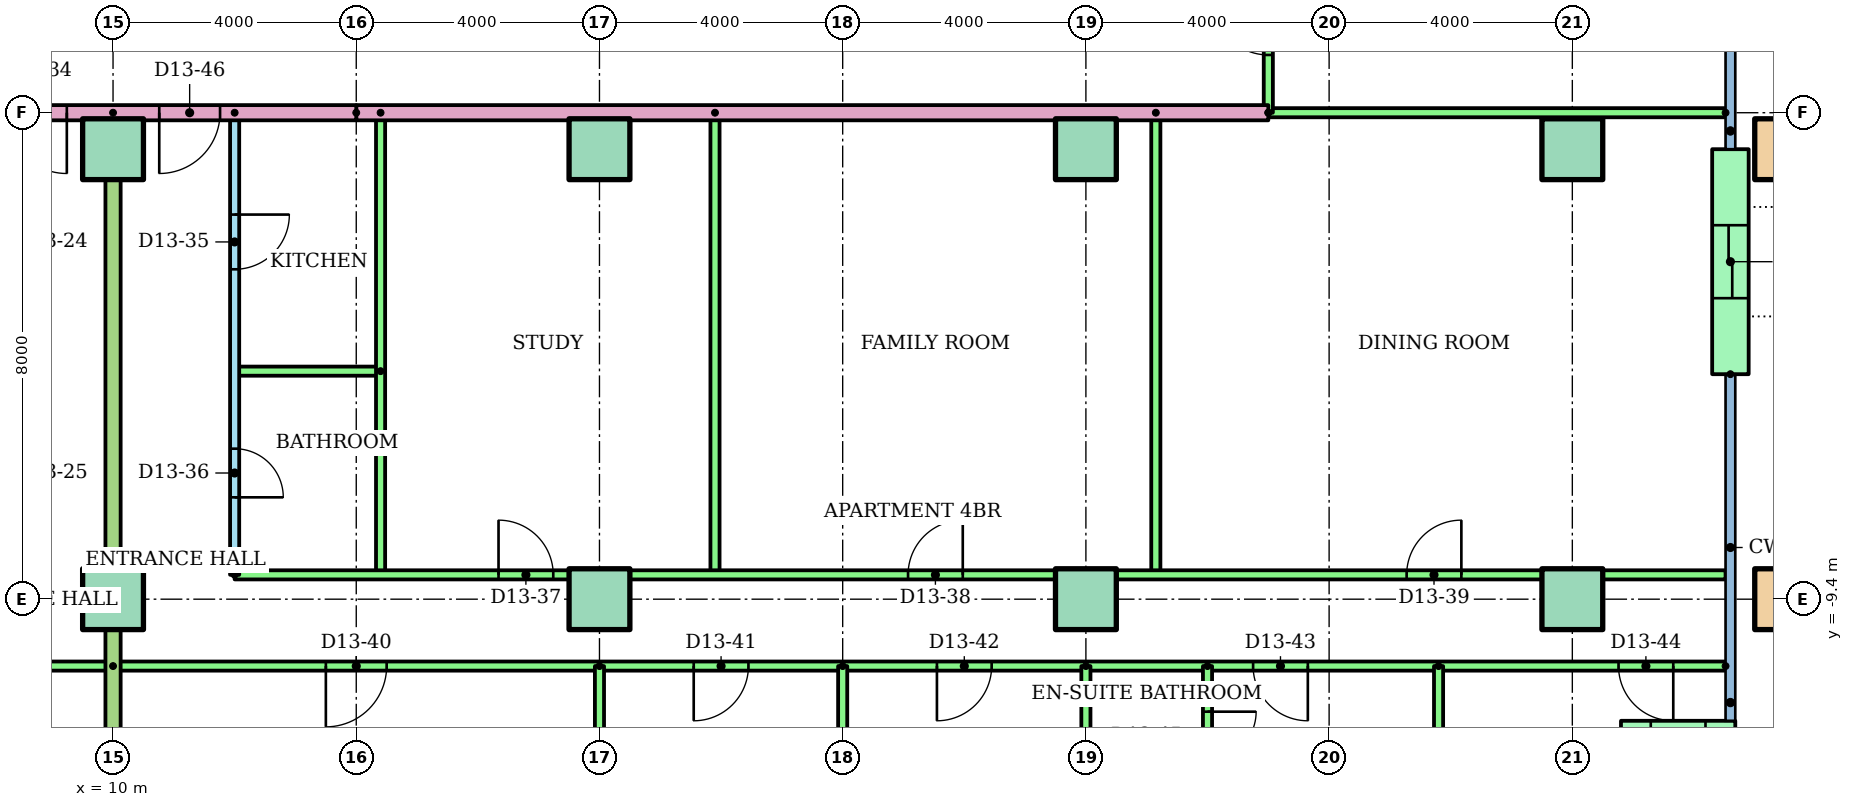
"""IFC4 building model, lengths in metres.
Left out: names, types, materials, properties, quantities, classifications, styles, units other than length and angle.
Written with IfcOpenShell. Run it as: python <this file> out.ifc"""

import sys

from ifc_helpers import new_model, si_unit, direction, frame, frame_2d, origin, origin_2d, place, context, subcontext, project, spatial, rectangle, hollow_rectangle, extrude, element, fill, save


model = new_model("IFC4")
c1 = context("Model", 3, precision=1e-05, world=origin(), true_north=direction((0.0, 1.0)))
c2 = subcontext(c1, "Body", "Model", "MODEL_VIEW")
j1 = project(units=[si_unit("LENGTHUNIT", "METRE"), si_unit("PLANEANGLEUNIT", "RADIAN")], contexts=[c1])
p1 = place(None, origin())
s1 = spatial("IfcSite", under=j1, at=p1, CompositionType="ELEMENT")
p2 = place(p1, origin())
s2 = spatial("IfcBuilding", under=s1, at=p2, CompositionType="ELEMENT")
p3 = place(p2, frame((0.0, 0.0, 51.2)))
s3 = spatial("IfcBuildingStorey", under=s2, at=p3, CompositionType="ELEMENT", Elevation=51.2)
for number, where in (
    (1, (10.0, -9.4, 0.0)),
    (2, (18.0, -9.4, 0.0)),
    (3, (26.0, -9.4, 0.0)),
    (4, (34.0, -9.4, 0.0)),
):
    element("IfcColumn", number, at=place(p3, frame(where)), inside=s3, PredefinedType="COLUMN", context=c2, shape_type="SweptSolid", body=[
        extrude(rectangle(XDim=1.0, YDim=1.0, at=origin_2d()), origin(), (0.0, 0.0, 1.0), 3.2),
    ])
p4 = place(p3, frame((37.5, -9.4, 0.0)))
e5 = element("IfcColumn", 5, at=p4, inside=s3, PredefinedType="COLUMN", context=c2, shape_type="SweptSolid", body=[
    extrude(hollow_rectangle(XDim=1.0, YDim=1.0, WallThickness=0.05, at=origin_2d()), origin(), (0.0, 0.0, 1.0), 3.2),
])
for number, where in (
    (6, (10.0, -2.0, 0.0)),
    (7, (18.0, -2.0, 0.0)),
    (8, (26.0, -2.0, 0.0)),
    (9, (34.0, -2.0, 0.0)),
):
    element("IfcColumn", number, at=place(p3, frame(where)), inside=s3, PredefinedType="COLUMN", context=c2, shape_type="SweptSolid", body=[
        extrude(rectangle(XDim=1.0, YDim=1.0, at=origin_2d()), origin(), (0.0, 0.0, 1.0), 3.2),
    ])
p5 = place(p3, frame((37.5, -2.0, 0.0)))
e10 = element("IfcColumn", 10, at=p5, inside=s3, PredefinedType="COLUMN", context=c2, shape_type="SweptSolid", body=[
    extrude(hollow_rectangle(XDim=1.0, YDim=1.0, WallThickness=0.05, at=origin_2d()), origin(), (0.0, 0.0, 1.0), 3.2),
])
p6 = place(p3, frame((34.8, -11.7, 0.0)))
e11 = element("IfcWall", 11, at=p6, inside=s3, PredefinedType="STANDARD", context=c2, shape_type="SweptSolid", body=[
    extrude(rectangle(XDim=1.88, YDim=0.6, at=frame_2d((0.94, 0.0))), origin(), (0.0, 0.0, 1.0), 2.92),
])
p7 = place(p6, frame((0.49, 0.0, 0.9)))
e12 = element("IfcOpeningElement", 12, at=p7, cuts=e11, PredefinedType="OPENING", context=c2, shape_type="SweptSolid", body=[
    extrude(rectangle(XDim=0.9, YDim=1.5, at=frame_2d((0.45, 0.75))), frame((0.0, 0.31, 0.0), z_axis=(0.0, -1.0, 0.0), x_axis=(1.0, 0.0, 0.0)), (0.0, 0.0, 1.0), 0.62),
])
p8 = place(p3, frame((36.6, -5.7, 0.0), z_axis=(0.0, 0.0, 1.0), x_axis=(0.0, 1.0, 0.0)))
e13 = element("IfcWall", 13, at=p8, inside=s3, PredefinedType="STANDARD", context=c2, shape_type="SweptSolid", body=[
    extrude(rectangle(XDim=3.7, YDim=0.6, at=frame_2d((1.85, 0.0))), origin(), (0.0, 0.0, 1.0), 2.92),
])
p9 = place(p8, frame((1.25, 0.0, 0.0)))
e14 = element("IfcOpeningElement", 14, at=p9, cuts=e13, PredefinedType="OPENING", context=c2, shape_type="SweptSolid", body=[
    extrude(rectangle(XDim=1.2, YDim=2.1, at=frame_2d((0.6, 1.05))), frame((0.0, 0.31, 0.0), z_axis=(0.0, -1.0, 0.0), x_axis=(1.0, 0.0, 0.0)), (0.0, 0.0, 1.0), 0.62),
])
p10 = place(p3, frame((10.0, -10.5, 0.0), z_axis=(0.0, 0.0, 1.0), x_axis=(-1.0, 0.0, 0.0)))
e15 = element("IfcWall", 15, at=p10, inside=s3, PredefinedType="PARTITIONING", context=c2, shape_type="SweptSolid", body=[
    extrude(rectangle(XDim=24.0, YDim=0.15, at=frame_2d((12.0, 0.0))), origin(), (0.0, 0.0, 1.0), 2.4),
])
p11 = place(p10, frame((19.5, 0.0, 0.0)))
e16 = element("IfcOpeningElement", 16, at=p11, cuts=e15, PredefinedType="OPENING", context=c2, shape_type="SweptSolid", body=[
    extrude(rectangle(XDim=1.0, YDim=2.1, at=frame_2d((0.5, 1.05))), frame((0.0, 0.085, 0.0), z_axis=(0.0, -1.0, 0.0), x_axis=(1.0, 0.0, 0.0)), (0.0, 0.0, 1.0), 0.17),
])
p12 = place(p10, frame((13.55, 0.0, 0.0)))
e17 = element("IfcOpeningElement", 17, at=p12, cuts=e15, PredefinedType="OPENING", context=c2, shape_type="SweptSolid", body=[
    extrude(rectangle(XDim=0.9, YDim=2.1, at=frame_2d((0.45, 1.05))), frame((0.0, 0.085, 0.0), z_axis=(0.0, -1.0, 0.0), x_axis=(1.0, 0.0, 0.0)), (0.0, 0.0, 1.0), 0.17),
])
p13 = place(p10, frame((9.55, 0.0, 0.0)))
e18 = element("IfcOpeningElement", 18, at=p13, cuts=e15, PredefinedType="OPENING", context=c2, shape_type="SweptSolid", body=[
    extrude(rectangle(XDim=0.9, YDim=2.1, at=frame_2d((0.45, 1.05))), frame((0.0, 0.085, 0.0), z_axis=(0.0, -1.0, 0.0), x_axis=(1.0, 0.0, 0.0)), (0.0, 0.0, 1.0), 0.17),
])
p14 = place(p10, frame((5.55, 0.0, 0.0)))
e19 = element("IfcOpeningElement", 19, at=p14, cuts=e15, PredefinedType="OPENING", context=c2, shape_type="SweptSolid", body=[
    extrude(rectangle(XDim=0.9, YDim=2.1, at=frame_2d((0.45, 1.05))), frame((0.0, 0.085, 0.0), z_axis=(0.0, -1.0, 0.0), x_axis=(1.0, 0.0, 0.0)), (0.0, 0.0, 1.0), 0.17),
])
p15 = place(p10, frame((1.55, 0.0, 0.0)))
e20 = element("IfcOpeningElement", 20, at=p15, cuts=e15, PredefinedType="OPENING", context=c2, shape_type="SweptSolid", body=[
    extrude(rectangle(XDim=0.9, YDim=2.1, at=frame_2d((0.45, 1.05))), frame((0.0, 0.085, 0.0), z_axis=(0.0, -1.0, 0.0), x_axis=(1.0, 0.0, 0.0)), (0.0, 0.0, 1.0), 0.17),
])
p16 = place(p3, frame((12.0, -1.4, 0.0), z_axis=(0.0, 0.0, 1.0), x_axis=(0.0, -1.0, 0.0)))
e21 = element("IfcWall", 21, at=p16, inside=s3, PredefinedType="PARTITIONING", context=c2, shape_type="SweptSolid", body=[
    extrude(rectangle(XDim=7.6, YDim=0.15, at=frame_2d((3.8, 0.0))), origin(), (0.0, 0.0, 1.0), 2.4),
])
p17 = place(p16, frame((1.675, 0.0, 0.0)))
e22 = element("IfcOpeningElement", 22, at=p17, cuts=e21, PredefinedType="OPENING", context=c2, shape_type="SweptSolid", body=[
    extrude(rectangle(XDim=0.9, YDim=2.1, at=frame_2d((0.45, 1.05))), frame((0.0, 0.085, 0.0), z_axis=(0.0, -1.0, 0.0), x_axis=(1.0, 0.0, 0.0)), (0.0, 0.0, 1.0), 0.17),
])
p18 = place(p16, frame((5.525, 0.0, 0.0)))
e23 = element("IfcOpeningElement", 23, at=p18, cuts=e21, PredefinedType="OPENING", context=c2, shape_type="SweptSolid", body=[
    extrude(rectangle(XDim=0.8, YDim=2.1, at=frame_2d((0.4, 1.05))), frame((0.0, 0.085, 0.0), z_axis=(0.0, -1.0, 0.0), x_axis=(1.0, 0.0, 0.0)), (0.0, 0.0, 1.0), 0.17),
])
p19 = place(p3, frame((14.4, -5.65, 0.0), z_axis=(0.0, 0.0, 1.0), x_axis=(-1.0, 0.0, 0.0)))
e24 = element("IfcWall", 24, at=p19, inside=s3, PredefinedType="PARTITIONING", context=c2, shape_type="SweptSolid", body=[
    extrude(rectangle(XDim=2.4, YDim=0.15, at=frame_2d((1.2, 0.0))), origin(), (0.0, 0.0, 1.0), 2.4),
])
for number, where, z_axis, x_axis in (
    (25, (14.4, -1.4, 0.0), (0.0, 0.0, 1.0), (0.0, -1.0, 0.0)),
    (26, (19.9, -1.4, 0.0), (0.0, 0.0, 1.0), (0.0, -1.0, 0.0)),
    (27, (27.15, -1.4, 0.0), (0.0, 0.0, 1.0), (0.0, -1.0, 0.0)),
):
    element("IfcWall", number, at=place(p3, frame(where, z_axis=z_axis, x_axis=x_axis)), inside=s3, PredefinedType="PARTITIONING", context=c2, shape_type="SweptSolid", body=[
        extrude(rectangle(XDim=7.6, YDim=0.15, at=frame_2d((3.8, 0.0))), origin(), (0.0, 0.0, 1.0), 2.4),
    ])
p20 = place(p3, frame((12.0, -9.0, 0.0)))
e28 = element("IfcWall", 28, at=p20, inside=s3, PredefinedType="PARTITIONING", context=c2, shape_type="SweptSolid", body=[
    extrude(rectangle(XDim=24.52, YDim=0.15, at=frame_2d((12.26, 0.0))), origin(), (0.0, 0.0, 1.0), 2.4),
])
p21 = place(p20, frame((4.34, 0.0, 0.0)))
e29 = element("IfcOpeningElement", 29, at=p21, cuts=e28, PredefinedType="OPENING", context=c2, shape_type="SweptSolid", body=[
    extrude(rectangle(XDim=0.9, YDim=2.1, at=frame_2d((0.45, 1.05))), frame((0.0, 0.085, 0.0), z_axis=(0.0, -1.0, 0.0), x_axis=(1.0, 0.0, 0.0)), (0.0, 0.0, 1.0), 0.17),
])
p22 = place(p20, frame((11.075, 0.0, 0.0)))
e30 = element("IfcOpeningElement", 30, at=p22, cuts=e28, PredefinedType="OPENING", context=c2, shape_type="SweptSolid", body=[
    extrude(rectangle(XDim=0.9, YDim=2.1, at=frame_2d((0.45, 1.05))), frame((0.0, 0.085, 0.0), z_axis=(0.0, -1.0, 0.0), x_axis=(1.0, 0.0, 0.0)), (0.0, 0.0, 1.0), 0.17),
])
p23 = place(p20, frame((19.275, 0.0, 0.0)))
e31 = element("IfcOpeningElement", 31, at=p23, cuts=e28, PredefinedType="OPENING", context=c2, shape_type="SweptSolid", body=[
    extrude(rectangle(XDim=0.9, YDim=2.1, at=frame_2d((0.45, 1.05))), frame((0.0, 0.085, 0.0), z_axis=(0.0, -1.0, 0.0), x_axis=(1.0, 0.0, 0.0)), (0.0, 0.0, 1.0), 0.17),
])
p24 = place(p3, frame((36.52, -10.5, 0.0), z_axis=(0.0, 0.0, 1.0), x_axis=(-1.0, 0.0, 0.0)))
e32 = element("IfcWall", 32, at=p24, inside=s3, PredefinedType="PARTITIONING", context=c2, shape_type="SweptSolid", body=[
    extrude(rectangle(XDim=26.52, YDim=0.15, at=frame_2d((13.26, 0.0))), origin(), (0.0, 0.0, 1.0), 2.4),
])
p25 = place(p24, frame((22.02, 0.0, 0.0)))
e33 = element("IfcOpeningElement", 33, at=p25, cuts=e32, PredefinedType="OPENING", context=c2, shape_type="SweptSolid", body=[
    extrude(rectangle(XDim=1.0, YDim=2.1, at=frame_2d((0.5, 1.05))), frame((0.0, 0.085, 0.0), z_axis=(0.0, -1.0, 0.0), x_axis=(1.0, 0.0, 0.0)), (0.0, 0.0, 1.0), 0.17),
])
p26 = place(p24, frame((16.07, 0.0, 0.0)))
e34 = element("IfcOpeningElement", 34, at=p26, cuts=e32, PredefinedType="OPENING", context=c2, shape_type="SweptSolid", body=[
    extrude(rectangle(XDim=0.9, YDim=2.1, at=frame_2d((0.45, 1.05))), frame((0.0, 0.085, 0.0), z_axis=(0.0, -1.0, 0.0), x_axis=(1.0, 0.0, 0.0)), (0.0, 0.0, 1.0), 0.17),
])
p27 = place(p24, frame((12.07, 0.0, 0.0)))
e35 = element("IfcOpeningElement", 35, at=p27, cuts=e32, PredefinedType="OPENING", context=c2, shape_type="SweptSolid", body=[
    extrude(rectangle(XDim=0.9, YDim=2.1, at=frame_2d((0.45, 1.05))), frame((0.0, 0.085, 0.0), z_axis=(0.0, -1.0, 0.0), x_axis=(1.0, 0.0, 0.0)), (0.0, 0.0, 1.0), 0.17),
])
p28 = place(p24, frame((6.87, 0.0, 0.0)))
e36 = element("IfcOpeningElement", 36, at=p28, cuts=e32, PredefinedType="OPENING", context=c2, shape_type="SweptSolid", body=[
    extrude(rectangle(XDim=0.9, YDim=2.1, at=frame_2d((0.45, 1.05))), frame((0.0, 0.085, 0.0), z_axis=(0.0, -1.0, 0.0), x_axis=(1.0, 0.0, 0.0)), (0.0, 0.0, 1.0), 0.17),
])
p29 = place(p24, frame((0.86, 0.0, 0.0)))
e37 = element("IfcOpeningElement", 37, at=p29, cuts=e32, PredefinedType="OPENING", context=c2, shape_type="SweptSolid", body=[
    extrude(rectangle(XDim=0.9, YDim=2.1, at=frame_2d((0.45, 1.05))), frame((0.0, 0.085, 0.0), z_axis=(0.0, -1.0, 0.0), x_axis=(1.0, 0.0, 0.0)), (0.0, 0.0, 1.0), 0.17),
])
p30 = place(p3, frame((18.0, -10.5, 0.0), z_axis=(0.0, 0.0, 1.0), x_axis=(0.0, -1.0, 0.0)))
e38 = element("IfcWall", 38, at=p30, inside=s3, PredefinedType="PARTITIONING", context=c2, shape_type="SweptSolid", body=[
    extrude(rectangle(XDim=5.61, YDim=0.15, at=frame_2d((2.805, 0.0))), origin(), (0.0, 0.0, 1.0), 2.4),
])
p31 = place(p3, frame((22.0, -10.5, 0.0), z_axis=(0.0, 0.0, 1.0), x_axis=(0.0, -1.0, 0.0)))
e39 = element("IfcWall", 39, at=p31, inside=s3, PredefinedType="PARTITIONING", context=c2, shape_type="SweptSolid", body=[
    extrude(rectangle(XDim=5.621, YDim=0.15, at=frame_2d((2.811, 0.0))), origin(), (0.0, 0.0, 1.0), 2.4),
])
p32 = place(p3, frame((26.0, -10.5, 0.0), z_axis=(0.0, 0.0, 1.0), x_axis=(0.0, -1.0, 0.0)))
e40 = element("IfcWall", 40, at=p32, inside=s3, PredefinedType="PARTITIONING", context=c2, shape_type="SweptSolid", body=[
    extrude(rectangle(XDim=5.61, YDim=0.15, at=frame_2d((2.805, 0.0))), origin(), (0.0, 0.0, 1.0), 2.4),
])
p33 = place(p3, frame((31.8, -10.5, 0.0), z_axis=(0.0, 0.0, 1.0), x_axis=(0.0, -1.0, 0.0)))
e41 = element("IfcWall", 41, at=p33, inside=s3, PredefinedType="PARTITIONING", context=c2, shape_type="SweptSolid", body=[
    extrude(rectangle(XDim=3.82, YDim=0.15, at=frame_2d((1.91, 0.0))), origin(), (0.0, 0.0, 1.0), 2.4),
])
p34 = place(p3, frame((28.0, -10.5, 0.0), z_axis=(0.0, 0.0, 1.0), x_axis=(0.0, -1.0, 0.0)))
e42 = element("IfcWall", 42, at=p34, inside=s3, PredefinedType="PARTITIONING", context=c2, shape_type="SweptSolid", body=[
    extrude(rectangle(XDim=2.3, YDim=0.15, at=frame_2d((1.15, 0.0))), origin(), (0.0, 0.0, 1.0), 2.4),
])
p35 = place(p34, frame((0.75, 0.0, 0.0)))
e43 = element("IfcOpeningElement", 43, at=p35, cuts=e42, PredefinedType="OPENING", context=c2, shape_type="SweptSolid", body=[
    extrude(rectangle(XDim=0.8, YDim=2.1, at=frame_2d((0.4, 1.05))), frame((0.0, 0.085, 0.0), z_axis=(0.0, -1.0, 0.0), x_axis=(1.0, 0.0, 0.0)), (0.0, 0.0, 1.0), 0.17),
])
p36 = place(p3, frame((10.0, -1.4, 0.0), z_axis=(0.0, 0.0, 1.0), x_axis=(0.0, -1.0, 0.0)))
e44 = element("IfcWall", 44, at=p36, inside=s3, PredefinedType="PARTITIONING", context=c2, shape_type="SweptSolid", body=[
    extrude(rectangle(XDim=14.71, YDim=0.25, at=frame_2d((7.355, 0.0))), origin(), (0.0, 0.0, 1.0), 2.4),
])
p37 = place(p3, frame((29.0, -1.4, 0.0), z_axis=(0.0, 0.0, 1.0), x_axis=(-1.0, 0.0, 0.0)))
e45 = element("IfcWall", 45, at=p37, inside=s3, PredefinedType="PARTITIONING", context=c2, shape_type="SweptSolid", body=[
    extrude(rectangle(XDim=15.0, YDim=0.25, at=frame_2d((7.5, 0.0))), origin(), (0.0, 0.0, 1.0), 2.4),
])
p38 = place(p3, frame((36.52, -1.4, 0.0), z_axis=(0.0, 0.0, 1.0), x_axis=(-1.0, 0.0, 0.0)))
e46 = element("IfcWall", 46, at=p38, inside=s3, PredefinedType="PARTITIONING", context=c2, shape_type="SweptSolid", body=[
    extrude(rectangle(XDim=7.52, YDim=0.15, at=frame_2d((3.76, 0.0))), origin(), (0.0, 0.0, 1.0), 2.4),
])
p39 = place(p3, frame((29.0, -1.4, 0.0), z_axis=(0.0, 0.0, 1.0), x_axis=(0.0, 1.0, 0.0)))
e47 = element("IfcWall", 47, at=p39, inside=s3, PredefinedType="PARTITIONING", context=c2, shape_type="SweptSolid", body=[
    extrude(rectangle(XDim=2.8, YDim=0.15, at=frame_2d((1.4, 0.0))), origin(), (0.0, 0.0, 1.0), 2.4),
])
p40 = place(p39, frame((0.95, 0.0, 0.0)))
e48 = element("IfcOpeningElement", 48, at=p40, cuts=e47, PredefinedType="OPENING", context=c2, shape_type="SweptSolid", body=[
    extrude(rectangle(XDim=0.9, YDim=2.1, at=frame_2d((0.45, 1.05))), frame((0.0, 0.085, 0.0), z_axis=(0.0, -1.0, 0.0), x_axis=(1.0, 0.0, 0.0)), (0.0, 0.0, 1.0), 0.17),
])
p41 = place(p3, frame((14.0, -1.4, 0.0), z_axis=(0.0, 0.0, 1.0), x_axis=(-1.0, 0.0, 0.0)))
e49 = element("IfcWall", 49, at=p41, inside=s3, PredefinedType="PARTITIONING", context=c2, shape_type="SweptSolid", body=[
    extrude(rectangle(XDim=28.0, YDim=0.25, at=frame_2d((14.0, 0.0))), origin(), (0.0, 0.0, 1.0), 2.4),
])
p42 = place(p41, frame((4.76, 0.0, 0.0)))
e50 = element("IfcOpeningElement", 50, at=p42, cuts=e49, PredefinedType="OPENING", context=c2, shape_type="SweptSolid", body=[
    extrude(rectangle(XDim=1.0, YDim=2.1, at=frame_2d((0.5, 1.05))), frame((0.0, 0.135, 0.0), z_axis=(0.0, -1.0, 0.0), x_axis=(1.0, 0.0, 0.0)), (0.0, 0.0, 1.0), 0.27),
])
p43 = place(p41, frame((2.24, 0.0, 0.0)))
e51 = element("IfcOpeningElement", 51, at=p43, cuts=e49, PredefinedType="OPENING", context=c2, shape_type="SweptSolid", body=[
    extrude(rectangle(XDim=1.0, YDim=2.1, at=frame_2d((0.5, 1.05))), frame((0.0, 0.135, 0.0), z_axis=(0.0, -1.0, 0.0), x_axis=(1.0, 0.0, 0.0)), (0.0, 0.0, 1.0), 0.27),
])
p44 = place(p42, origin())
e52 = element("IfcDoor", 52, at=p44, inside=s3, OperationType="SINGLE_SWING_LEFT", PredefinedType="DOOR", context=c2, shape_type="SweptSolid", body=[
    extrude(rectangle(XDim=1.0, YDim=2.1, at=frame_2d((0.5, 1.05))), frame((0.0, 0.025, 0.0), z_axis=(0.0, -1.0, 0.0), x_axis=(1.0, 0.0, 0.0)), (0.0, 0.0, 1.0), 0.05),
])
fill(e50, e52)
p45 = place(p17, origin())
e53 = element("IfcDoor", 53, at=p45, inside=s3, OperationType="SINGLE_SWING_LEFT", PredefinedType="DOOR", context=c2, shape_type="SweptSolid", body=[
    extrude(rectangle(XDim=0.9, YDim=2.1, at=frame_2d((0.45, 1.05))), frame((0.0, 0.025, 0.0), z_axis=(0.0, -1.0, 0.0), x_axis=(1.0, 0.0, 0.0)), (0.0, 0.0, 1.0), 0.05),
])
fill(e22, e53)
p46 = place(p18, origin())
e54 = element("IfcDoor", 54, at=p46, inside=s3, OperationType="SINGLE_SWING_RIGHT", PredefinedType="DOOR", context=c2, shape_type="SweptSolid", body=[
    extrude(rectangle(XDim=0.8, YDim=2.1, at=frame_2d((0.4, 1.05))), frame((0.0, 0.025, 0.0), z_axis=(0.0, -1.0, 0.0), x_axis=(1.0, 0.0, 0.0)), (0.0, 0.0, 1.0), 0.05),
])
fill(e23, e54)
p47 = place(p21, origin())
e55 = element("IfcDoor", 55, at=p47, inside=s3, OperationType="SINGLE_SWING_LEFT", PredefinedType="DOOR", context=c2, shape_type="SweptSolid", body=[
    extrude(rectangle(XDim=0.9, YDim=2.1, at=frame_2d((0.45, 1.05))), frame((0.0, 0.025, 0.0), z_axis=(0.0, -1.0, 0.0), x_axis=(1.0, 0.0, 0.0)), (0.0, 0.0, 1.0), 0.05),
])
fill(e29, e55)
p48 = place(p22, origin())
e56 = element("IfcDoor", 56, at=p48, inside=s3, OperationType="SINGLE_SWING_RIGHT", PredefinedType="DOOR", context=c2, shape_type="SweptSolid", body=[
    extrude(rectangle(XDim=0.9, YDim=2.1, at=frame_2d((0.45, 1.05))), frame((0.0, 0.025, 0.0), z_axis=(0.0, -1.0, 0.0), x_axis=(1.0, 0.0, 0.0)), (0.0, 0.0, 1.0), 0.05),
])
fill(e30, e56)
p49 = place(p23, origin())
e57 = element("IfcDoor", 57, at=p49, inside=s3, OperationType="SINGLE_SWING_RIGHT", PredefinedType="DOOR", context=c2, shape_type="SweptSolid", body=[
    extrude(rectangle(XDim=0.9, YDim=2.1, at=frame_2d((0.45, 1.05))), frame((0.0, 0.025, 0.0), z_axis=(0.0, -1.0, 0.0), x_axis=(1.0, 0.0, 0.0)), (0.0, 0.0, 1.0), 0.05),
])
fill(e31, e57)
p50 = place(p25, origin())
e58 = element("IfcDoor", 58, at=p50, inside=s3, OperationType="SINGLE_SWING_RIGHT", PredefinedType="DOOR", context=c2, shape_type="SweptSolid", body=[
    extrude(rectangle(XDim=1.0, YDim=2.1, at=frame_2d((0.5, 1.05))), frame((0.0, 0.025, 0.0), z_axis=(0.0, -1.0, 0.0), x_axis=(1.0, 0.0, 0.0)), (0.0, 0.0, 1.0), 0.05),
])
fill(e33, e58)
p51 = place(p26, origin())
e59 = element("IfcDoor", 59, at=p51, inside=s3, OperationType="SINGLE_SWING_RIGHT", PredefinedType="DOOR", context=c2, shape_type="SweptSolid", body=[
    extrude(rectangle(XDim=0.9, YDim=2.1, at=frame_2d((0.45, 1.05))), frame((0.0, 0.025, 0.0), z_axis=(0.0, -1.0, 0.0), x_axis=(1.0, 0.0, 0.0)), (0.0, 0.0, 1.0), 0.05),
])
fill(e34, e59)
p52 = place(p27, origin())
e60 = element("IfcDoor", 60, at=p52, inside=s3, OperationType="SINGLE_SWING_RIGHT", PredefinedType="DOOR", context=c2, shape_type="SweptSolid", body=[
    extrude(rectangle(XDim=0.9, YDim=2.1, at=frame_2d((0.45, 1.05))), frame((0.0, 0.025, 0.0), z_axis=(0.0, -1.0, 0.0), x_axis=(1.0, 0.0, 0.0)), (0.0, 0.0, 1.0), 0.05),
])
fill(e35, e60)
p53 = place(p28, origin())
e61 = element("IfcDoor", 61, at=p53, inside=s3, OperationType="SINGLE_SWING_LEFT", PredefinedType="DOOR", context=c2, shape_type="SweptSolid", body=[
    extrude(rectangle(XDim=0.9, YDim=2.1, at=frame_2d((0.45, 1.05))), frame((0.0, 0.025, 0.0), z_axis=(0.0, -1.0, 0.0), x_axis=(1.0, 0.0, 0.0)), (0.0, 0.0, 1.0), 0.05),
])
fill(e36, e61)
p54 = place(p29, origin())
e62 = element("IfcDoor", 62, at=p54, inside=s3, OperationType="SINGLE_SWING_LEFT", PredefinedType="DOOR", context=c2, shape_type="SweptSolid", body=[
    extrude(rectangle(XDim=0.9, YDim=2.1, at=frame_2d((0.45, 1.05))), frame((0.0, 0.025, 0.0), z_axis=(0.0, -1.0, 0.0), x_axis=(1.0, 0.0, 0.0)), (0.0, 0.0, 1.0), 0.05),
])
fill(e37, e62)
p55 = place(p35, origin())
e63 = element("IfcDoor", 63, at=p55, inside=s3, OperationType="SINGLE_SWING_LEFT", PredefinedType="DOOR", context=c2, shape_type="SweptSolid", body=[
    extrude(rectangle(XDim=0.8, YDim=2.1, at=frame_2d((0.4, 1.05))), frame((0.0, 0.025, 0.0), z_axis=(0.0, -1.0, 0.0), x_axis=(1.0, 0.0, 0.0)), (0.0, 0.0, 1.0), 0.05),
])
fill(e43, e63)
p56 = place(p43, origin())
e64 = element("IfcDoor", 64, at=p56, inside=s3, OperationType="SINGLE_SWING_RIGHT", PredefinedType="DOOR", context=c2, shape_type="SweptSolid", body=[
    extrude(rectangle(XDim=1.0, YDim=2.1, at=frame_2d((0.5, 1.05))), frame((0.0, 0.025, 0.0), z_axis=(0.0, -1.0, 0.0), x_axis=(1.0, 0.0, 0.0)), (0.0, 0.0, 1.0), 0.05),
])
fill(e51, e64)
p57 = place(p40, origin())
e65 = element("IfcDoor", 65, at=p57, inside=s3, OperationType="SINGLE_SWING_RIGHT", PredefinedType="DOOR", context=c2, shape_type="SweptSolid", body=[
    extrude(rectangle(XDim=0.9, YDim=2.1, at=frame_2d((0.45, 1.05))), frame((0.0, 0.025, 0.0), z_axis=(0.0, -1.0, 0.0), x_axis=(1.0, 0.0, 0.0)), (0.0, 0.0, 1.0), 0.05),
])
fill(e48, e65)
p58 = place(p9, origin())
e66 = element("IfcDoor", 66, at=p58, inside=s3, OperationType="SLIDING_TO_LEFT", PredefinedType="DOOR", context=c2, shape_type="SweptSolid", body=[
    extrude(rectangle(XDim=1.2, YDim=2.1, at=frame_2d((0.6, 1.05))), frame((0.0, 0.025, 0.0), z_axis=(0.0, -1.0, 0.0), x_axis=(1.0, 0.0, 0.0)), (0.0, 0.0, 1.0), 0.05),
])
fill(e14, e66)
save(model, sys.argv[1])
